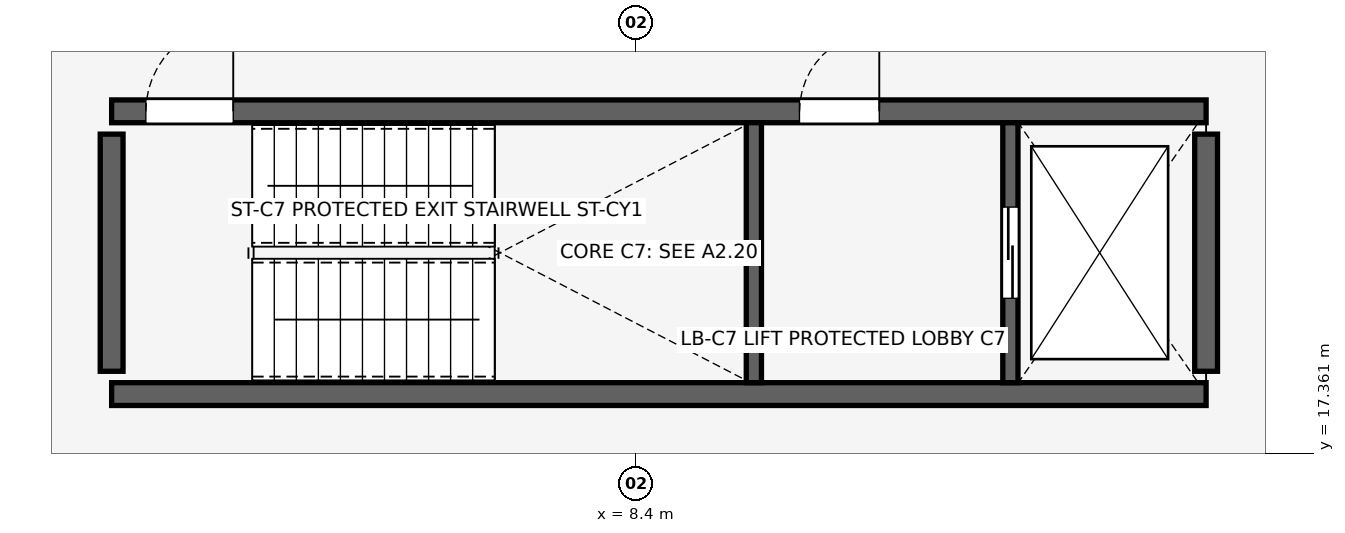
"""IFC4 building model, lengths in metres.
Left out: names, types, materials, properties, quantities, classifications, styles, units other than length and angle.
Written with IfcOpenShell. Run it as: python <this file> out.ifc"""

import sys

from ifc_helpers import new_model, si_unit, direction, frame, frame_2d, origin, place, context, subcontext, project, spatial, rectangle, extrude, element, fill, save


model = new_model("IFC4")
c1 = context("Model", 3, precision=1e-05, world=origin(), true_north=direction((0.0, 1.0)))
c2 = subcontext(c1, "Body", "Model", "MODEL_VIEW")
j1 = project(units=[si_unit("LENGTHUNIT", "METRE"), si_unit("PLANEANGLEUNIT", "RADIAN")], contexts=[c1])
p1 = place(None, origin())
s1 = spatial("IfcSite", under=j1, at=p1, CompositionType="ELEMENT")
p2 = place(p1, origin())
s2 = spatial("IfcBuilding", under=s1, at=p2, CompositionType="ELEMENT")
p3 = place(p2, frame((0.0, 0.0, 5.44)))
s3 = spatial("IfcBuildingStorey", under=s2, at=p3, CompositionType="ELEMENT", Elevation=5.44)
p4 = place(p3, frame((1.5, 18.14, 0.0), z_axis=(0.0, 0.0, 1.0), x_axis=(1.0, 0.0, 0.0)))
e1 = element("IfcWall", 1, at=p4, inside=s3, PredefinedType="SHEAR", context=c2, shape_type="SweptSolid", body=[
    extrude(rectangle(XDim=14.4, YDim=0.3, at=frame_2d((7.2, 0.0))), origin(), (0.0, 0.0, 1.0), 3.8),
])
p5 = place(p3, frame((1.5, 21.86, 0.0), z_axis=(0.0, 0.0, 1.0), x_axis=(1.0, 0.0, 0.0)))
e2 = element("IfcWall", 2, at=p5, inside=s3, PredefinedType="SHEAR", context=c2, shape_type="SweptSolid", body=[
    extrude(rectangle(XDim=14.4, YDim=0.3, at=frame_2d((7.2, 0.0))), origin(), (0.0, 0.0, 1.0), 3.8),
])
p6 = place(p5, frame((0.45, 0.0, 0.0), z_axis=(0.0, 0.0, 1.0), x_axis=(1.0, 0.0, 0.0)))
e3 = element("IfcOpeningElement", 3, at=p6, cuts=e2, PredefinedType="OPENING", context=c2, shape_type="SweptSolid", body=[
    extrude(rectangle(XDim=1.15, YDim=2.15, at=frame_2d((0.575, 1.075))), frame((0.0, 0.16, 0.0), z_axis=(0.0, -1.0, 0.0), x_axis=(1.0, 0.0, 0.0)), (0.0, 0.0, 1.0), 0.32),
])
p7 = place(p5, frame((9.05, 0.0, 0.0), z_axis=(0.0, 0.0, 1.0), x_axis=(1.0, 0.0, 0.0)))
e4 = element("IfcOpeningElement", 4, at=p7, cuts=e2, PredefinedType="OPENING", context=c2, shape_type="SweptSolid", body=[
    extrude(rectangle(XDim=1.05, YDim=2.15, at=frame_2d((0.525, 1.075))), frame((0.0, 0.16, 0.0), z_axis=(0.0, -1.0, 0.0), x_axis=(1.0, 0.0, 0.0)), (0.0, 0.0, 1.0), 0.32),
])
for number, where, z_axis, x_axis in (
    (5, (1.5, 18.44, 0.0), (0.0, 0.0, 1.0), (0.0, 1.0, 0.0)),
    (6, (15.9, 18.44, 0.0), (0.0, 0.0, 1.0), (0.0, 1.0, 0.0)),
):
    element("IfcWall", number, at=place(p3, frame(where, z_axis=z_axis, x_axis=x_axis)), inside=s3, PredefinedType="SHEAR", context=c2, shape_type="SweptSolid", body=[
        extrude(rectangle(XDim=3.12, YDim=0.3, at=frame_2d((1.56, 0.0))), origin(), (0.0, 0.0, 1.0), 3.8),
    ])
p8 = place(p3, frame((9.95, 18.29, 0.0), z_axis=(0.0, 0.0, 1.0), x_axis=(0.0, 1.0, 0.0)))
e7 = element("IfcWall", 7, at=p8, inside=s3, PredefinedType="SHEAR", context=c2, shape_type="SweptSolid", body=[
    extrude(rectangle(XDim=3.42, YDim=0.2, at=frame_2d((1.71, 0.0))), origin(), (0.0, 0.0, 1.0), 3.8),
])
p9 = place(p3, frame((13.325, 18.29, 0.0), z_axis=(0.0, 0.0, 1.0), x_axis=(0.0, 1.0, 0.0)))
e8 = element("IfcWall", 8, at=p9, inside=s3, PredefinedType="SHEAR", context=c2, shape_type="SweptSolid", body=[
    extrude(rectangle(XDim=3.42, YDim=0.2, at=frame_2d((1.71, 0.0))), origin(), (0.0, 0.0, 1.0), 3.8),
])
p10 = place(p9, frame((1.11, 0.0, 0.0), z_axis=(0.0, 0.0, 1.0), x_axis=(1.0, 0.0, 0.0)))
e9 = element("IfcOpeningElement", 9, at=p10, cuts=e8, PredefinedType="OPENING", context=c2, shape_type="SweptSolid", body=[
    extrude(rectangle(XDim=1.2, YDim=2.2, at=frame_2d((0.6, 1.1))), frame((0.0, 0.11, 0.0), z_axis=(0.0, -1.0, 0.0), x_axis=(1.0, 0.0, 0.0)), (0.0, 0.0, 1.0), 0.22),
])
p11 = place(p6, origin())
e10 = element("IfcDoor", 10, at=p11, inside=s3, OperationType="SINGLE_SWING_RIGHT", PredefinedType="DOOR", context=c2, shape_type="SweptSolid", body=[
    extrude(rectangle(XDim=1.15, YDim=2.15, at=frame_2d((0.575, 1.075))), frame((0.0, 0.025, 0.0), z_axis=(0.0, -1.0, 0.0), x_axis=(1.0, 0.0, 0.0)), (0.0, 0.0, 1.0), 0.05),
])
fill(e3, e10)
p12 = place(p7, origin())
e11 = element("IfcDoor", 11, at=p12, inside=s3, OperationType="SINGLE_SWING_RIGHT", PredefinedType="DOOR", context=c2, shape_type="SweptSolid", body=[
    extrude(rectangle(XDim=1.05, YDim=2.15, at=frame_2d((0.525, 1.075))), frame((0.0, 0.025, 0.0), z_axis=(0.0, -1.0, 0.0), x_axis=(1.0, 0.0, 0.0)), (0.0, 0.0, 1.0), 0.05),
])
fill(e4, e11)
p13 = place(p10, origin())
e12 = element("IfcDoor", 12, at=p13, inside=s3, OperationType="DOUBLE_DOOR_SLIDING", PredefinedType="DOOR", context=c2, shape_type="SweptSolid", body=[
    extrude(rectangle(XDim=1.2, YDim=2.2, at=frame_2d((0.6, 1.1))), frame((0.0, 0.025, 0.0), z_axis=(0.0, -1.0, 0.0), x_axis=(1.0, 0.0, 0.0)), (0.0, 0.0, 1.0), 0.05),
])
fill(e9, e12)
save(model, sys.argv[1])
